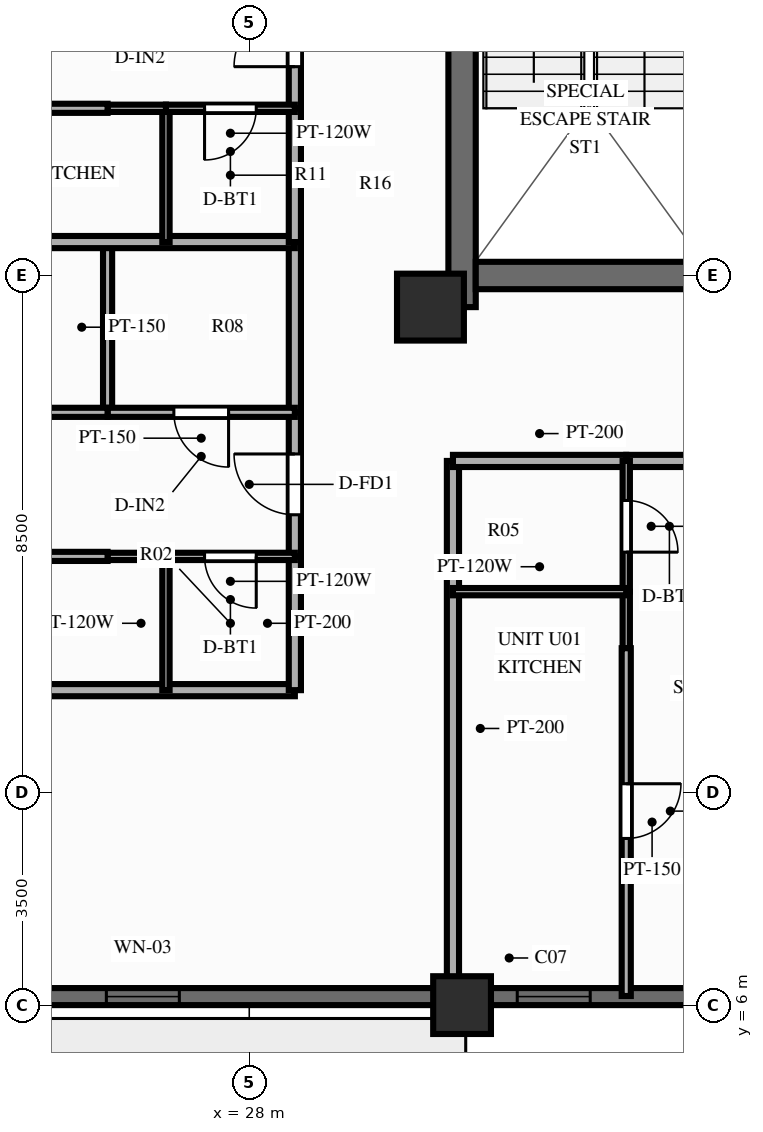
"""IFC4 building model, lengths in metres.
Left out: names, types, materials, properties, quantities, classifications, styles, units other than length and angle.
Written with IfcOpenShell. Run it as: python <this file> out.ifc"""

import sys

from ifc_helpers import new_model, si_unit, direction, frame, frame_2d, origin, origin_2d, place, context, subcontext, project, spatial, rectangle, extrude, source, transform, mapped, element, fill, save


model = new_model("IFC4")
c1 = context("Model", 3, precision=1e-05, world=origin(), true_north=direction((0.0, 1.0)))
c2 = subcontext(c1, "Body", "Model", "MODEL_VIEW")
j1 = project(units=[si_unit("LENGTHUNIT", "METRE"), si_unit("PLANEANGLEUNIT", "RADIAN")], contexts=[c1])
p1 = place(None, origin())
s1 = spatial("IfcSite", under=j1, at=p1, CompositionType="ELEMENT")
p2 = place(p1, origin())
s2 = spatial("IfcBuilding", under=s1, at=p2, CompositionType="ELEMENT")
p3 = place(p2, frame((0.0, 0.0, 152.2)))
s3 = spatial("IfcBuildingStorey", under=s2, at=p3, CompositionType="ELEMENT", Elevation=152.2)
p4 = place(p3, frame((31.5, 17.48, 0.0), z_axis=(0.0, 0.0, 1.0), x_axis=(0.0, 1.0, 0.0)))
e1 = element("IfcWall", 1, at=p4, inside=s3, PredefinedType="SHEAR", context=c2, shape_type="SweptSolid", body=[
    extrude(rectangle(XDim=19.04, YDim=0.45, at=frame_2d((9.52, 0.0))), origin(), (0.0, 0.0, 1.0), 3.9),
])
p5 = place(p4, frame((6.32, 0.0, 0.0)))
e2 = element("IfcOpeningElement", 2, at=p5, cuts=e1, PredefinedType="OPENING", context=c2, shape_type="SweptSolid", body=[
    extrude(rectangle(XDim=1.1, YDim=2.15, at=frame_2d((0.55, 1.075))), frame((0.0, 0.237, 0.0), z_axis=(0.0, -1.0, 0.0), x_axis=(1.0, 0.0, 0.0)), (0.0, 0.0, 1.0), 0.474),
])
p6 = place(p3, frame((31.725, 18.0, 0.0), z_axis=(0.0, 0.0, 1.0), x_axis=(1.0, 0.0, 0.0)))
e3 = element("IfcWall", 3, at=p6, inside=s3, PredefinedType="SHEAR", context=c2, shape_type="SweptSolid", body=[
    extrude(rectangle(XDim=12.55, YDim=0.45, at=frame_2d((6.275, 0.0))), origin(), (0.0, 0.0, 1.0), 3.9),
])
m1 = source(origin(), c2, "Body", "SweptSolid", [
    extrude(rectangle(XDim=1.1, YDim=1.1, at=origin_2d()), origin(), (0.0, 0.0, 1.0), 3.9),
])
p7 = place(p3, frame((30.98, 17.48, 0.0), z_axis=(0.0, 0.0, 1.0), x_axis=(1.0, 0.0, 0.0)))
e4 = element("IfcColumn", 4, at=p7, inside=s3, PredefinedType="COLUMN", context=c2, shape_type="MappedRepresentation", body=[
    mapped(m1, transform((0.0, 0.0, 0.0), scale=1.0)),
])
m2 = source(origin(), c2, "Body", "SweptSolid", [
    extrude(rectangle(XDim=0.95, YDim=0.95, at=origin_2d()), origin(), (0.0, 0.0, 1.0), 3.9),
])
p8 = place(p3, frame((31.5, 6.0, 0.0), z_axis=(0.0, 0.0, 1.0), x_axis=(1.0, 0.0, 0.0)))
e5 = element("IfcColumn", 5, at=p8, inside=s3, PredefinedType="COLUMN", context=c2, shape_type="MappedRepresentation", body=[
    mapped(m2, transform((0.0, 0.0, 0.0), scale=1.0)),
])
p9 = place(p3, frame((21.0, 6.14, 0.0), z_axis=(0.0, 0.0, 1.0), x_axis=(1.0, 0.0, 0.0)))
e6 = element("IfcWall", 6, at=p9, inside=s3, PredefinedType="SOLIDWALL", context=c2, shape_type="SweptSolid", body=[
    extrude(rectangle(XDim=34.0, YDim=0.28, at=frame_2d((17.0, 0.0))), origin(), (0.0, 0.0, 1.0), 2.44),
])
p10 = place(p9, frame((4.65, 0.0, 0.25)))
e7 = element("IfcOpeningElement", 7, at=p10, cuts=e6, PredefinedType="OPENING", context=c2, shape_type="SweptSolid", body=[
    extrude(rectangle(XDim=1.2, YDim=1.5, at=frame_2d((0.6, 0.75))), frame((0.0, 0.152, 0.0), z_axis=(0.0, -1.0, 0.0), x_axis=(1.0, 0.0, 0.0)), (0.0, 0.0, 1.0), 0.304),
])
p11 = place(p9, frame((11.407, 0.0, 0.25)))
e8 = element("IfcOpeningElement", 8, at=p11, cuts=e6, PredefinedType="OPENING", context=c2, shape_type="SweptSolid", body=[
    extrude(rectangle(XDim=1.2, YDim=1.5, at=frame_2d((0.6, 0.75))), frame((0.0, 0.152, 0.0), z_axis=(0.0, -1.0, 0.0), x_axis=(1.0, 0.0, 0.0)), (0.0, 0.0, 1.0), 0.304),
])
p12 = place(p9, frame((14.5, 0.0, 0.25)))
e9 = element("IfcOpeningElement", 9, at=p12, cuts=e6, PredefinedType="OPENING", context=c2, shape_type="SweptSolid", body=[
    extrude(rectangle(XDim=1.2, YDim=1.5, at=frame_2d((0.6, 0.75))), frame((0.0, 0.152, 0.0), z_axis=(0.0, -1.0, 0.0), x_axis=(1.0, 0.0, 0.0)), (0.0, 0.0, 1.0), 0.304),
])
p13 = place(p9, frame((18.3, 0.0, 0.25)))
e10 = element("IfcOpeningElement", 10, at=p13, cuts=e6, PredefinedType="OPENING", context=c2, shape_type="SweptSolid", body=[
    extrude(rectangle(XDim=1.2, YDim=1.5, at=frame_2d((0.6, 0.75))), frame((0.0, 0.152, 0.0), z_axis=(0.0, -1.0, 0.0), x_axis=(1.0, 0.0, 0.0)), (0.0, 0.0, 1.0), 0.304),
])
p14 = place(p9, frame((21.393, 0.0, 0.25)))
e11 = element("IfcOpeningElement", 11, at=p14, cuts=e6, PredefinedType="OPENING", context=c2, shape_type="SweptSolid", body=[
    extrude(rectangle(XDim=1.2, YDim=1.5, at=frame_2d((0.6, 0.75))), frame((0.0, 0.152, 0.0), z_axis=(0.0, -1.0, 0.0), x_axis=(1.0, 0.0, 0.0)), (0.0, 0.0, 1.0), 0.304),
])
p15 = place(p9, frame((28.15, 0.0, 0.25)))
e12 = element("IfcOpeningElement", 12, at=p15, cuts=e6, PredefinedType="OPENING", context=c2, shape_type="SweptSolid", body=[
    extrude(rectangle(XDim=1.2, YDim=1.5, at=frame_2d((0.6, 0.75))), frame((0.0, 0.152, 0.0), z_axis=(0.0, -1.0, 0.0), x_axis=(1.0, 0.0, 0.0)), (0.0, 0.0, 1.0), 0.304),
])
p16 = place(p3, frame((31.35, 14.95, 0.0), z_axis=(0.0, 0.0, 1.0), x_axis=(0.0, -1.0, 0.0)))
e13 = element("IfcWall", 13, at=p16, inside=s3, PredefinedType="PARTITIONING", context=c2, shape_type="SweptSolid", body=[
    extrude(rectangle(XDim=8.8, YDim=0.2, at=frame_2d((4.4, 0.0))), origin(), (0.0, 0.0, 1.0), 2.44),
])
p17 = place(p3, frame((31.35, 14.95, 0.0), z_axis=(0.0, 0.0, 1.0), x_axis=(1.0, 0.0, 0.0)))
e14 = element("IfcWall", 14, at=p17, inside=s3, PredefinedType="PARTITIONING", context=c2, shape_type="SweptSolid", body=[
    extrude(rectangle(XDim=2.85, YDim=0.2, at=frame_2d((1.425, 0.0))), origin(), (0.0, 0.0, 1.0), 3.56),
])
p18 = place(p3, frame((34.2, 14.95, 0.0), z_axis=(0.0, 0.0, 1.0), x_axis=(1.0, 0.0, 0.0)))
e15 = element("IfcWall", 15, at=p18, inside=s3, PredefinedType="PARTITIONING", context=c2, shape_type="SweptSolid", body=[
    extrude(rectangle(XDim=3.8, YDim=0.2, at=frame_2d((1.9, 0.0))), origin(), (0.0, 0.0, 1.0), 3.56),
])
p19 = place(p18, frame((1.4, 0.0, 0.0)))
e16 = element("IfcOpeningElement", 16, at=p19, cuts=e15, PredefinedType="OPENING", context=c2, shape_type="SweptSolid", body=[
    extrude(rectangle(XDim=1.0, YDim=2.15, at=frame_2d((0.5, 1.075))), frame((0.0, 0.112, 0.0), z_axis=(0.0, -1.0, 0.0), x_axis=(1.0, 0.0, 0.0)), (0.0, 0.0, 1.0), 0.224),
])
p20 = place(p3, frame((34.2, 14.95, 0.0), z_axis=(0.0, 0.0, 1.0), x_axis=(0.0, -1.0, 0.0)))
e17 = element("IfcWall", 17, at=p20, inside=s3, PredefinedType="PARTITIONING", context=c2, shape_type="SweptSolid", body=[
    extrude(rectangle(XDim=2.15, YDim=0.12, at=frame_2d((1.075, 0.0))), origin(), (0.0, 0.0, 1.0), 3.56),
])
p21 = place(p20, frame((0.65, 0.0, 0.0)))
e18 = element("IfcOpeningElement", 18, at=p21, cuts=e17, PredefinedType="OPENING", context=c2, shape_type="SweptSolid", body=[
    extrude(rectangle(XDim=0.85, YDim=2.05, at=frame_2d((0.425, 1.025))), frame((0.0, 0.072, 0.0), z_axis=(0.0, -1.0, 0.0), x_axis=(1.0, 0.0, 0.0)), (0.0, 0.0, 1.0), 0.144),
])
p22 = place(p3, frame((34.2, 12.8, 0.0), z_axis=(0.0, 0.0, 1.0), x_axis=(0.0, -1.0, 0.0)))
e19 = element("IfcWall", 19, at=p22, inside=s3, PredefinedType="PARTITIONING", context=c2, shape_type="SweptSolid", body=[
    extrude(rectangle(XDim=0.93, YDim=0.12, at=frame_2d((0.465, 0.0))), origin(), (0.0, 0.0, 1.0), 3.56),
])
p23 = place(p3, frame((31.35, 12.8, 0.0), z_axis=(0.0, 0.0, 1.0), x_axis=(1.0, 0.0, 0.0)))
e20 = element("IfcWall", 20, at=p23, inside=s3, PredefinedType="PARTITIONING", context=c2, shape_type="SweptSolid", body=[
    extrude(rectangle(XDim=2.85, YDim=0.12, at=frame_2d((1.425, 0.0))), origin(), (0.0, 0.0, 1.0), 3.56),
])
p24 = place(p3, frame((34.2, 11.87, 0.0), z_axis=(0.0, 0.0, 1.0), x_axis=(0.0, -1.0, 0.0)))
e21 = element("IfcWall", 21, at=p24, inside=s3, PredefinedType="PARTITIONING", context=c2, shape_type="SweptSolid", body=[
    extrude(rectangle(XDim=5.72, YDim=0.15, at=frame_2d((2.86, 0.0))), origin(), (0.0, 0.0, 1.0), 3.56),
])
p25 = place(p24, frame((2.229, 0.0, 0.0)))
e22 = element("IfcOpeningElement", 22, at=p25, cuts=e21, PredefinedType="OPENING", context=c2, shape_type="SweptSolid", body=[
    extrude(rectangle(XDim=0.9, YDim=2.1, at=frame_2d((0.45, 1.05))), frame((0.0, 0.087, 0.0), z_axis=(0.0, -1.0, 0.0), x_axis=(1.0, 0.0, 0.0)), (0.0, 0.0, 1.0), 0.174),
])
p26 = place(p3, frame((28.75, 11.18, 0.0), z_axis=(0.0, 0.0, 1.0), x_axis=(-1.0, 0.0, 0.0)))
e23 = element("IfcWall", 23, at=p26, inside=s3, PredefinedType="PARTITIONING", context=c2, shape_type="SweptSolid", body=[
    extrude(rectangle(XDim=12.6, YDim=0.2, at=frame_2d((6.3, 0.0))), origin(), (0.0, 0.0, 1.0), 3.56),
])
p27 = place(p3, frame((28.75, 11.18, 0.0), z_axis=(0.0, 0.0, 1.0), x_axis=(0.0, 1.0, 0.0)))
e24 = element("IfcWall", 24, at=p27, inside=s3, PredefinedType="PARTITIONING", context=c2, shape_type="SweptSolid", body=[
    extrude(rectangle(XDim=2.2, YDim=0.2, at=frame_2d((1.1, 0.0))), origin(), (0.0, 0.0, 1.0), 3.56),
])
p28 = place(p3, frame((28.75, 13.38, 0.0), z_axis=(0.0, 0.0, 1.0), x_axis=(0.0, 1.0, 0.0)))
e25 = element("IfcWall", 25, at=p28, inside=s3, PredefinedType="PARTITIONING", context=c2, shape_type="SweptSolid", body=[
    extrude(rectangle(XDim=2.37, YDim=0.2, at=frame_2d((1.185, 0.0))), origin(), (0.0, 0.0, 1.0), 3.56),
])
p29 = place(p28, frame((0.685, 0.0, 0.0)))
e26 = element("IfcOpeningElement", 26, at=p29, cuts=e25, PredefinedType="OPENING", context=c2, shape_type="SweptSolid", body=[
    extrude(rectangle(XDim=1.0, YDim=2.15, at=frame_2d((0.5, 1.075))), frame((0.0, 0.112, 0.0), z_axis=(0.0, -1.0, 0.0), x_axis=(1.0, 0.0, 0.0)), (0.0, 0.0, 1.0), 0.224),
])
p30 = place(p3, frame((28.75, 15.75, 0.0), z_axis=(0.0, 0.0, 1.0), x_axis=(0.0, 1.0, 0.0)))
e27 = element("IfcWall", 27, at=p30, inside=s3, PredefinedType="PARTITIONING", context=c2, shape_type="SweptSolid", body=[
    extrude(rectangle(XDim=2.801, YDim=0.2, at=frame_2d((1.4, 0.0))), origin(), (0.0, 0.0, 1.0), 3.56),
])
p31 = place(p3, frame((26.63, 11.18, 0.0), z_axis=(0.0, 0.0, 1.0), x_axis=(0.0, 1.0, 0.0)))
e28 = element("IfcWall", 28, at=p31, inside=s3, PredefinedType="PARTITIONING", context=c2, shape_type="SweptSolid", body=[
    extrude(rectangle(XDim=2.2, YDim=0.12, at=frame_2d((1.1, 0.0))), origin(), (0.0, 0.0, 1.0), 3.56),
])
p32 = place(p3, frame((25.67, 15.75, 0.0), z_axis=(0.0, 0.0, 1.0), x_axis=(0.0, 1.0, 0.0)))
e29 = element("IfcWall", 29, at=p32, inside=s3, PredefinedType="PARTITIONING", context=c2, shape_type="SweptSolid", body=[
    extrude(rectangle(XDim=2.801, YDim=0.15, at=frame_2d((1.4, 0.0))), origin(), (0.0, 0.0, 1.0), 3.56),
])
p33 = place(p3, frame((28.75, 13.38, 0.0), z_axis=(0.0, 0.0, 1.0), x_axis=(-1.0, 0.0, 0.0)))
e30 = element("IfcWall", 30, at=p33, inside=s3, PredefinedType="PARTITIONING", context=c2, shape_type="SweptSolid", body=[
    extrude(rectangle(XDim=2.12, YDim=0.12, at=frame_2d((1.06, 0.0))), origin(), (0.0, 0.0, 1.0), 3.56),
])
p34 = place(p33, frame((0.635, 0.0, 0.0)))
e31 = element("IfcOpeningElement", 31, at=p34, cuts=e30, PredefinedType="OPENING", context=c2, shape_type="SweptSolid", body=[
    extrude(rectangle(XDim=0.85, YDim=2.05, at=frame_2d((0.425, 1.025))), frame((0.0, 0.072, 0.0), z_axis=(0.0, -1.0, 0.0), x_axis=(1.0, 0.0, 0.0)), (0.0, 0.0, 1.0), 0.144),
])
p35 = place(p3, frame((26.63, 13.38, 0.0), z_axis=(0.0, 0.0, 1.0), x_axis=(-1.0, 0.0, 0.0)))
e32 = element("IfcWall", 32, at=p35, inside=s3, PredefinedType="PARTITIONING", context=c2, shape_type="SweptSolid", body=[
    extrude(rectangle(XDim=0.96, YDim=0.12, at=frame_2d((0.48, 0.0))), origin(), (0.0, 0.0, 1.0), 3.56),
])
p36 = place(p3, frame((25.67, 13.38, 0.0), z_axis=(0.0, 0.0, 1.0), x_axis=(-1.0, 0.0, 0.0)))
e33 = element("IfcWall", 33, at=p36, inside=s3, PredefinedType="PARTITIONING", context=c2, shape_type="SweptSolid", body=[
    extrude(rectangle(XDim=9.52, YDim=0.15, at=frame_2d((4.76, 0.0))), origin(), (0.0, 0.0, 1.0), 3.56),
])
p37 = place(p36, frame((3.971, 0.0, 0.0)))
e34 = element("IfcOpeningElement", 34, at=p37, cuts=e33, PredefinedType="OPENING", context=c2, shape_type="SweptSolid", body=[
    extrude(rectangle(XDim=0.9, YDim=2.1, at=frame_2d((0.45, 1.05))), frame((0.0, 0.087, 0.0), z_axis=(0.0, -1.0, 0.0), x_axis=(1.0, 0.0, 0.0)), (0.0, 0.0, 1.0), 0.174),
])
p38 = place(p3, frame((28.75, 15.75, 0.0), z_axis=(0.0, 0.0, 1.0), x_axis=(-1.0, 0.0, 0.0)))
e35 = element("IfcWall", 35, at=p38, inside=s3, PredefinedType="PARTITIONING", context=c2, shape_type="SweptSolid", body=[
    extrude(rectangle(XDim=3.08, YDim=0.15, at=frame_2d((1.54, 0.0))), origin(), (0.0, 0.0, 1.0), 3.56),
])
p39 = place(p38, frame((1.09, 0.0, 0.0)))
e36 = element("IfcOpeningElement", 36, at=p39, cuts=e35, PredefinedType="OPENING", context=c2, shape_type="SweptSolid", body=[
    extrude(rectangle(XDim=0.9, YDim=2.1, at=frame_2d((0.45, 1.05))), frame((0.0, 0.087, 0.0), z_axis=(0.0, -1.0, 0.0), x_axis=(1.0, 0.0, 0.0)), (0.0, 0.0, 1.0), 0.174),
])
p40 = place(p3, frame((25.67, 15.75, 0.0), z_axis=(0.0, 0.0, 1.0), x_axis=(-1.0, 0.0, 0.0)))
e37 = element("IfcWall", 37, at=p40, inside=s3, PredefinedType="PARTITIONING", context=c2, shape_type="SweptSolid", body=[
    extrude(rectangle(XDim=9.52, YDim=0.15, at=frame_2d((4.76, 0.0))), origin(), (0.0, 0.0, 1.0), 3.56),
])
p41 = place(p40, frame((3.971, 0.0, 0.0)))
e38 = element("IfcOpeningElement", 38, at=p41, cuts=e37, PredefinedType="OPENING", context=c2, shape_type="SweptSolid", body=[
    extrude(rectangle(XDim=0.9, YDim=2.1, at=frame_2d((0.45, 1.05))), frame((0.0, 0.087, 0.0), z_axis=(0.0, -1.0, 0.0), x_axis=(1.0, 0.0, 0.0)), (0.0, 0.0, 1.0), 0.174),
])
p42 = place(p3, frame((28.75, 18.55, 0.0), z_axis=(0.0, 0.0, 1.0), x_axis=(-1.0, 0.0, 0.0)))
e39 = element("IfcWall", 39, at=p42, inside=s3, PredefinedType="PARTITIONING", context=c2, shape_type="SweptSolid", body=[
    extrude(rectangle(XDim=12.6, YDim=0.2, at=frame_2d((6.3, 0.0))), origin(), (0.0, 0.0, 1.0), 3.56),
])
p43 = place(p3, frame((28.75, 18.55, 0.0), z_axis=(0.0, 0.0, 1.0), x_axis=(0.0, 1.0, 0.0)))
e40 = element("IfcWall", 40, at=p43, inside=s3, PredefinedType="PARTITIONING", context=c2, shape_type="SweptSolid", body=[
    extrude(rectangle(XDim=2.2, YDim=0.2, at=frame_2d((1.1, 0.0))), origin(), (0.0, 0.0, 1.0), 3.56),
])
p44 = place(p3, frame((28.75, 20.75, 0.0), z_axis=(0.0, 0.0, 1.0), x_axis=(0.0, 1.0, 0.0)))
e41 = element("IfcWall", 41, at=p44, inside=s3, PredefinedType="PARTITIONING", context=c2, shape_type="SweptSolid", body=[
    extrude(rectangle(XDim=2.369, YDim=0.2, at=frame_2d((1.185, 0.0))), origin(), (0.0, 0.0, 1.0), 3.56),
])
p45 = place(p44, frame((0.685, 0.0, 0.0)))
e42 = element("IfcOpeningElement", 42, at=p45, cuts=e41, PredefinedType="OPENING", context=c2, shape_type="SweptSolid", body=[
    extrude(rectangle(XDim=1.0, YDim=2.15, at=frame_2d((0.5, 1.075))), frame((0.0, 0.112, 0.0), z_axis=(0.0, -1.0, 0.0), x_axis=(1.0, 0.0, 0.0)), (0.0, 0.0, 1.0), 0.224),
])
p46 = place(p3, frame((26.63, 18.55, 0.0), z_axis=(0.0, 0.0, 1.0), x_axis=(0.0, 1.0, 0.0)))
e43 = element("IfcWall", 43, at=p46, inside=s3, PredefinedType="PARTITIONING", context=c2, shape_type="SweptSolid", body=[
    extrude(rectangle(XDim=2.2, YDim=0.12, at=frame_2d((1.1, 0.0))), origin(), (0.0, 0.0, 1.0), 3.56),
])
p47 = place(p3, frame((28.75, 20.75, 0.0), z_axis=(0.0, 0.0, 1.0), x_axis=(-1.0, 0.0, 0.0)))
e44 = element("IfcWall", 44, at=p47, inside=s3, PredefinedType="PARTITIONING", context=c2, shape_type="SweptSolid", body=[
    extrude(rectangle(XDim=2.12, YDim=0.12, at=frame_2d((1.06, 0.0))), origin(), (0.0, 0.0, 1.0), 3.56),
])
p48 = place(p47, frame((0.635, 0.0, 0.0)))
e45 = element("IfcOpeningElement", 45, at=p48, cuts=e44, PredefinedType="OPENING", context=c2, shape_type="SweptSolid", body=[
    extrude(rectangle(XDim=0.85, YDim=2.05, at=frame_2d((0.425, 1.025))), frame((0.0, 0.072, 0.0), z_axis=(0.0, -1.0, 0.0), x_axis=(1.0, 0.0, 0.0)), (0.0, 0.0, 1.0), 0.144),
])
p49 = place(p3, frame((26.63, 20.75, 0.0), z_axis=(0.0, 0.0, 1.0), x_axis=(-1.0, 0.0, 0.0)))
e46 = element("IfcWall", 46, at=p49, inside=s3, PredefinedType="PARTITIONING", context=c2, shape_type="SweptSolid", body=[
    extrude(rectangle(XDim=0.96, YDim=0.12, at=frame_2d((0.48, 0.0))), origin(), (0.0, 0.0, 1.0), 3.56),
])
p50 = place(p3, frame((25.67, 20.75, 0.0), z_axis=(0.0, 0.0, 1.0), x_axis=(-1.0, 0.0, 0.0)))
e47 = element("IfcWall", 47, at=p50, inside=s3, PredefinedType="PARTITIONING", context=c2, shape_type="SweptSolid", body=[
    extrude(rectangle(XDim=9.52, YDim=0.15, at=frame_2d((4.76, 0.0))), origin(), (0.0, 0.0, 1.0), 3.56),
])
p51 = place(p50, frame((3.971, 0.0, 0.0)))
e48 = element("IfcOpeningElement", 48, at=p51, cuts=e47, PredefinedType="OPENING", context=c2, shape_type="SweptSolid", body=[
    extrude(rectangle(XDim=0.9, YDim=2.1, at=frame_2d((0.45, 1.05))), frame((0.0, 0.087, 0.0), z_axis=(0.0, -1.0, 0.0), x_axis=(1.0, 0.0, 0.0)), (0.0, 0.0, 1.0), 0.174),
])
m3 = source(origin(), c2, "Body", "SweptSolid", [
    extrude(rectangle(XDim=1.2, YDim=1.5, at=frame_2d((0.6, 0.75))), frame((0.0, 0.03, 0.0), z_axis=(0.0, -1.0, 0.0), x_axis=(1.0, 0.0, 0.0)), (0.0, 0.0, 1.0), 0.06),
])
p52 = place(p10, origin())
e49 = element("IfcWindow", 49, at=p52, inside=s3, PartitioningType="SINGLE_PANEL", PredefinedType="WINDOW", context=c2, shape_type="MappedRepresentation", body=[
    mapped(m3, transform((0.0, 0.0, 0.0), scale=1.0)),
])
fill(e7, e49)
p53 = place(p11, origin())
e50 = element("IfcWindow", 50, at=p53, inside=s3, PartitioningType="SINGLE_PANEL", PredefinedType="WINDOW", context=c2, shape_type="MappedRepresentation", body=[
    mapped(m3, transform((0.0, 0.0, 0.0), scale=1.0)),
])
fill(e8, e50)
m4 = source(origin(), c2, "Body", "SweptSolid", [
    extrude(rectangle(XDim=0.85, YDim=2.05, at=frame_2d((0.425, 1.025))), frame((0.0, 0.025, 0.0), z_axis=(0.0, -1.0, 0.0), x_axis=(1.0, 0.0, 0.0)), (0.0, 0.0, 1.0), 0.05),
])
p54 = place(p21, origin())
e51 = element("IfcDoor", 51, at=p54, inside=s3, OperationType="SINGLE_SWING_RIGHT", PredefinedType="DOOR", context=c2, shape_type="MappedRepresentation", body=[
    mapped(m4, transform((0.0, 0.0, 0.0), scale=1.0)),
])
fill(e18, e51)
m5 = source(origin(), c2, "Body", "SweptSolid", [
    extrude(rectangle(XDim=0.9, YDim=2.1, at=frame_2d((0.45, 1.05))), frame((0.0, 0.025, 0.0), z_axis=(0.0, -1.0, 0.0), x_axis=(1.0, 0.0, 0.0)), (0.0, 0.0, 1.0), 0.05),
])
p55 = place(p25, origin())
e52 = element("IfcDoor", 52, at=p55, inside=s3, OperationType="SINGLE_SWING_LEFT", PredefinedType="DOOR", context=c2, shape_type="MappedRepresentation", body=[
    mapped(m5, transform((0.0, 0.0, 0.0), scale=1.0)),
])
fill(e22, e52)
m6 = source(origin(), c2, "Body", "SweptSolid", [
    extrude(rectangle(XDim=1.0, YDim=2.15, at=frame_2d((0.5, 1.075))), frame((0.0, 0.025, 0.0), z_axis=(0.0, -1.0, 0.0), x_axis=(1.0, 0.0, 0.0)), (0.0, 0.0, 1.0), 0.05),
])
p56 = place(p29, origin())
e53 = element("IfcDoor", 53, at=p56, inside=s3, OperationType="SINGLE_SWING_RIGHT", PredefinedType="DOOR", context=c2, shape_type="MappedRepresentation", body=[
    mapped(m6, transform((0.0, 0.0, 0.0), scale=1.0)),
])
fill(e26, e53)
p57 = place(p34, origin())
e54 = element("IfcDoor", 54, at=p57, inside=s3, OperationType="SINGLE_SWING_LEFT", PredefinedType="DOOR", context=c2, shape_type="MappedRepresentation", body=[
    mapped(m4, transform((0.0, 0.0, 0.0), scale=1.0)),
])
fill(e31, e54)
p58 = place(p39, origin())
e55 = element("IfcDoor", 55, at=p58, inside=s3, OperationType="SINGLE_SWING_LEFT", PredefinedType="DOOR", context=c2, shape_type="MappedRepresentation", body=[
    mapped(m5, transform((0.0, 0.0, 0.0), scale=1.0)),
])
fill(e36, e55)
p59 = place(p45, origin())
e56 = element("IfcDoor", 56, at=p59, inside=s3, OperationType="SINGLE_SWING_LEFT", PredefinedType="DOOR", context=c2, shape_type="MappedRepresentation", body=[
    mapped(m6, transform((0.0, 0.0, 0.0), scale=1.0)),
])
fill(e42, e56)
p60 = place(p48, origin())
e57 = element("IfcDoor", 57, at=p60, inside=s3, OperationType="SINGLE_SWING_RIGHT", PredefinedType="DOOR", context=c2, shape_type="MappedRepresentation", body=[
    mapped(m4, transform((0.0, 0.0, 0.0), scale=1.0)),
])
fill(e45, e57)
save(model, sys.argv[1])
